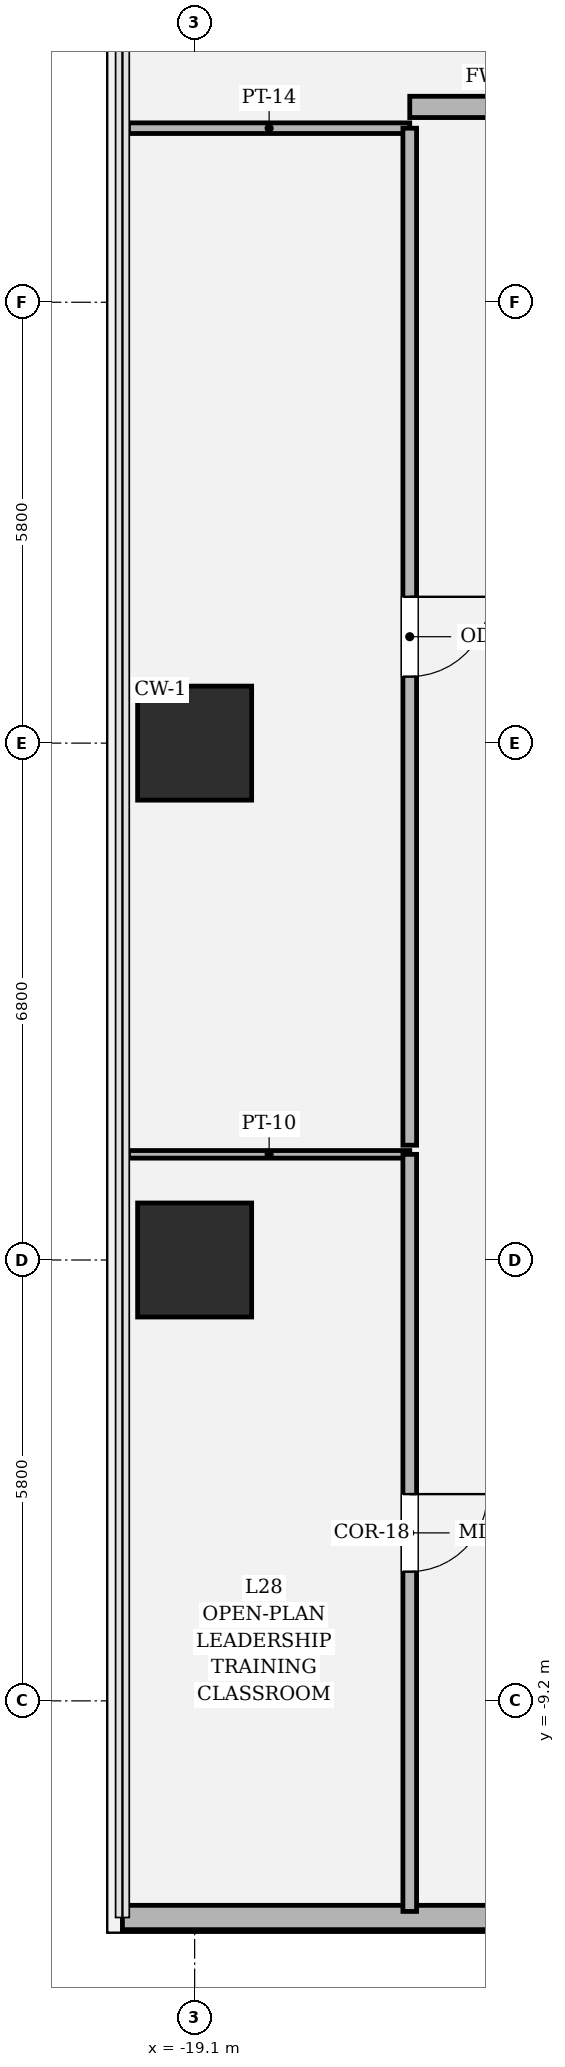
"""IFC4 building model, lengths in metres.
Left out: names, types, materials, properties, quantities, classifications, styles, units other than length and angle.
Written with IfcOpenShell. Run it as: python <this file> out.ifc"""

import sys

from ifc_helpers import new_model, si_unit, direction, frame, frame_2d, origin, origin_2d, place, context, subcontext, project, spatial, rectangle, hollow_rectangle, extrude, element, fill, save


model = new_model("IFC4")
c1 = context("Model", 3, precision=1e-05, world=origin(), true_north=direction((0.0, 1.0)))
c2 = subcontext(c1, "Body", "Model", "MODEL_VIEW")
j1 = project(units=[si_unit("LENGTHUNIT", "METRE"), si_unit("PLANEANGLEUNIT", "RADIAN")], contexts=[c1])
p1 = place(None, origin())
s1 = spatial("IfcSite", under=j1, at=p1, CompositionType="ELEMENT")
p2 = place(p1, origin())
s2 = spatial("IfcBuilding", under=s1, at=p2, CompositionType="ELEMENT")
p3 = place(p2, frame((0.0, 0.0, 121.35)))
s3 = spatial("IfcBuildingStorey", under=s2, at=p3, CompositionType="ELEMENT", Elevation=121.35)
for number, where, z_axis, x_axis in (
    (1, (-19.1, 3.4, 0.0), (0.0, 0.0, 1.0), (1.0, 0.0, 0.0)),
    (2, (-19.1, -3.4, 0.0), (0.0, 0.0, 1.0), (1.0, 0.0, 0.0)),
):
    element("IfcColumn", number, at=place(p3, frame(where, z_axis=z_axis, x_axis=x_axis)), inside=s3, PredefinedType="COLUMN", context=c2, shape_type="SweptSolid", body=[
        extrude(hollow_rectangle(XDim=1.5, YDim=1.5, WallThickness=0.045, at=origin_2d()), origin(), (0.0, 0.0, 1.0), 4.05),
    ])
p4 = place(p3, frame((-20.05, -12.05, 0.0), z_axis=(0.0, 0.0, 1.0), x_axis=(1.0, 0.0, 0.0)))
e3 = element("IfcWall", 3, at=p4, inside=s3, PredefinedType="SOLIDWALL", context=c2, shape_type="SweptSolid", body=[
    extrude(rectangle(XDim=6.4, YDim=0.32, at=frame_2d((3.2, 0.0))), origin(), (0.0, 0.0, 1.0), 2.404),
])
p5 = place(p3, frame((-19.97, -2.01, 0.0), z_axis=(0.0, 0.0, 1.0), x_axis=(1.0, 0.0, 0.0)))
e4 = element("IfcWall", 4, at=p5, inside=s3, PredefinedType="PARTITIONING", context=c2, shape_type="SweptSolid", body=[
    extrude(rectangle(XDim=3.7, YDim=0.1, at=frame_2d((1.85, 0.0))), origin(), (0.0, 0.0, 1.0), 2.404),
])
p6 = place(p3, frame((-16.27, -2.01, 0.0), z_axis=(0.0, 0.0, 1.0), x_axis=(0.0, -1.0, 0.0)))
e5 = element("IfcWall", 5, at=p6, inside=s3, PredefinedType="PARTITIONING", context=c2, shape_type="SweptSolid", body=[
    extrude(rectangle(XDim=9.96, YDim=0.18, at=frame_2d((4.98, 0.0))), origin(), (0.0, 0.0, 1.0), 2.404),
])
p7 = place(p6, frame((4.47, 0.0, 0.0)))
e6 = element("IfcOpeningElement", 6, at=p7, cuts=e5, PredefinedType="OPENING", context=c2, shape_type="SweptSolid", body=[
    extrude(rectangle(XDim=1.02, YDim=2.2, at=frame_2d((0.51, 1.1))), frame((0.0, 0.1, 0.0), z_axis=(0.0, -1.0, 0.0), x_axis=(1.0, 0.0, 0.0)), (0.0, 0.0, 1.0), 0.2),
])
p8 = place(p3, frame((-19.97, 11.49, 0.0), z_axis=(0.0, 0.0, 1.0), x_axis=(1.0, 0.0, 0.0)))
e7 = element("IfcWall", 7, at=p8, inside=s3, PredefinedType="PARTITIONING", context=c2, shape_type="SweptSolid", body=[
    extrude(rectangle(XDim=3.7, YDim=0.14, at=frame_2d((1.85, 0.0))), origin(), (0.0, 0.0, 1.0), 2.404),
])
p9 = place(p3, frame((-16.27, 11.49, 0.0), z_axis=(0.0, 0.0, 1.0), x_axis=(0.0, -1.0, 0.0)))
e8 = element("IfcWall", 8, at=p9, inside=s3, PredefinedType="PARTITIONING", context=c2, shape_type="SweptSolid", body=[
    extrude(rectangle(XDim=13.38, YDim=0.18, at=frame_2d((6.69, 0.0))), origin(), (0.0, 0.0, 1.0), 2.404),
])
p10 = place(p9, frame((6.165, 0.0, 0.0)))
e9 = element("IfcOpeningElement", 9, at=p10, cuts=e8, PredefinedType="OPENING", context=c2, shape_type="SweptSolid", body=[
    extrude(rectangle(XDim=1.05, YDim=2.2, at=frame_2d((0.525, 1.1))), frame((0.0, 0.1, 0.0), z_axis=(0.0, -1.0, 0.0), x_axis=(1.0, 0.0, 0.0)), (0.0, 0.0, 1.0), 0.2),
])
p11 = place(p3, frame((-13.98, 11.77, 0.0), z_axis=(0.0, 0.0, 1.0), x_axis=(-1.0, 0.0, 0.0)))
e10 = element("IfcWall", 10, at=p11, inside=s3, PredefinedType="SOLIDWALL", context=c2, shape_type="SweptSolid", body=[
    extrude(rectangle(XDim=2.29, YDim=0.28, at=frame_2d((1.145, 0.0))), origin(), (0.0, 0.0, 1.0), 2.444),
])
p12 = place(p7, origin())
e11 = element("IfcDoor", 11, at=p12, inside=s3, OperationType="SINGLE_SWING_LEFT", PredefinedType="DOOR", context=c2, shape_type="SweptSolid", body=[
    extrude(rectangle(XDim=1.02, YDim=2.2, at=frame_2d((0.51, 1.1))), frame((0.0, 0.025, 0.0), z_axis=(0.0, -1.0, 0.0), x_axis=(1.0, 0.0, 0.0)), (0.0, 0.0, 1.0), 0.05),
])
fill(e6, e11)
p13 = place(p10, origin())
e12 = element("IfcDoor", 12, at=p13, inside=s3, OperationType="SINGLE_SWING_LEFT", PredefinedType="DOOR", context=c2, shape_type="SweptSolid", body=[
    extrude(rectangle(XDim=1.05, YDim=2.2, at=frame_2d((0.525, 1.1))), frame((0.0, 0.025, 0.0), z_axis=(0.0, -1.0, 0.0), x_axis=(1.0, 0.0, 0.0)), (0.0, 0.0, 1.0), 0.05),
])
fill(e9, e12)
save(model, sys.argv[1])
